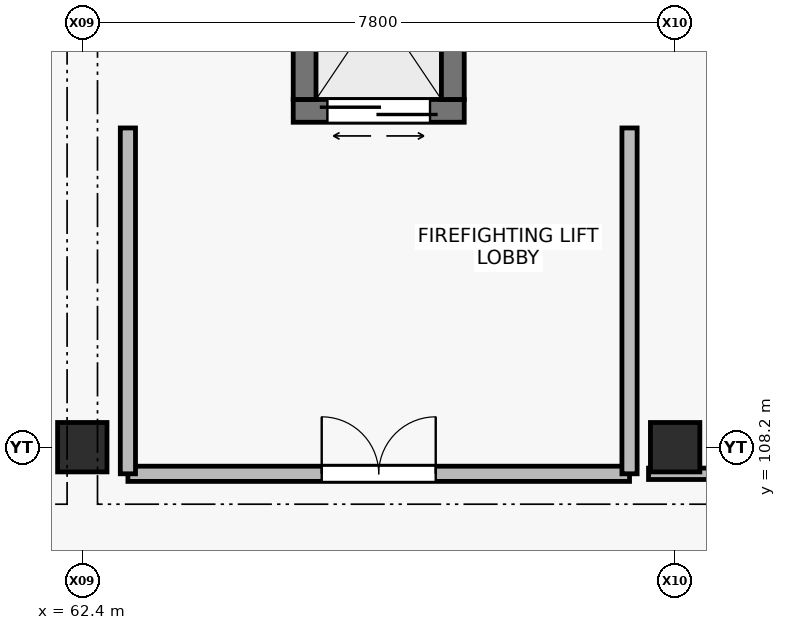
"""IFC4 building model, lengths in metres.
Left out: names, types, materials, properties, quantities, classifications, styles, units other than length and angle.
Written with IfcOpenShell. Run it as: python <this file> out.ifc"""

import sys

from ifc_helpers import new_model, si_unit, direction, frame, frame_2d, origin, origin_2d, place, context, subcontext, project, spatial, rectangle, extrude, element, fill, save


model = new_model("IFC4")
c1 = context("Model", 3, precision=1e-05, world=origin(), true_north=direction((0.0, 1.0)))
c2 = subcontext(c1, "Body", "Model", "MODEL_VIEW")
j1 = project(units=[si_unit("LENGTHUNIT", "METRE"), si_unit("PLANEANGLEUNIT", "RADIAN")], contexts=[c1])
p1 = place(None, origin())
s1 = spatial("IfcSite", under=j1, at=p1, CompositionType="ELEMENT")
p2 = place(p1, origin())
s2 = spatial("IfcBuilding", under=s1, at=p2, CompositionType="ELEMENT")
p3 = place(p2, origin())
s3 = spatial("IfcBuildingStorey", under=s2, at=p3, CompositionType="ELEMENT", Elevation=0.0)
for number, where, z_axis, x_axis in (
    (1, (62.4, 108.2, 0.0), (0.0, 0.0, 1.0), (1.0, 0.0, 0.0)),
    (2, (70.2, 108.2, 0.0), (0.0, 0.0, 1.0), (1.0, 0.0, 0.0)),
):
    element("IfcColumn", number, at=place(p3, frame(where, z_axis=z_axis, x_axis=x_axis)), inside=s3, PredefinedType="COLUMN", context=c2, shape_type="SweptSolid", body=[
        extrude(rectangle(XDim=0.65, YDim=0.65, at=origin_2d()), origin(), (0.0, 0.0, 1.0), 4.8),
    ])
p4 = place(p3, frame((65.175, 112.625, 0.0), z_axis=(0.0, 0.0, 1.0), x_axis=(1.0, 0.0, 0.0)))
e3 = element("IfcWall", 3, at=p4, inside=s3, PredefinedType="SHEAR", context=c2, shape_type="SweptSolid", body=[
    extrude(rectangle(XDim=2.25, YDim=0.3, at=frame_2d((1.125, 0.0))), origin(), (0.0, 0.0, 1.0), 4.54),
])
p5 = place(p4, frame((0.45, 0.0, 0.0)))
e4 = element("IfcOpeningElement", 4, at=p5, cuts=e3, PredefinedType="OPENING", context=c2, shape_type="SweptSolid", body=[
    extrude(rectangle(XDim=1.35, YDim=2.3, at=frame_2d((0.675, 1.15))), frame((0.0, 0.16, 0.0), z_axis=(0.0, -1.0, 0.0), x_axis=(1.0, 0.0, 0.0)), (0.0, 0.0, 1.0), 0.32),
])
for number, where, z_axis, x_axis in (
    (5, (65.325, 115.225, 0.0), (0.0, 0.0, 1.0), (0.0, -1.0, 0.0)),
    (6, (67.275, 112.775, 0.0), (0.0, 0.0, 1.0), (0.0, 1.0, 0.0)),
):
    element("IfcWall", number, at=place(p3, frame(where, z_axis=z_axis, x_axis=x_axis)), inside=s3, PredefinedType="SHEAR", context=c2, shape_type="SweptSolid", body=[
        extrude(rectangle(XDim=2.45, YDim=0.3, at=frame_2d((1.225, 0.0))), origin(), (0.0, 0.0, 1.0), 4.54),
    ])
p6 = place(p3, frame((63.0, 107.85, 0.0), z_axis=(0.0, 0.0, 1.0), x_axis=(1.0, 0.0, 0.0)))
e7 = element("IfcWall", 7, at=p6, inside=s3, PredefinedType="SOLIDWALL", context=c2, shape_type="SweptSolid", body=[
    extrude(rectangle(XDim=6.6, YDim=0.2, at=frame_2d((3.3, 0.0))), origin(), (0.0, 0.0, 1.0), 4.04),
])
p7 = place(p6, frame((2.55, 0.0, 0.0)))
e8 = element("IfcOpeningElement", 8, at=p7, cuts=e7, PredefinedType="OPENING", context=c2, shape_type="SweptSolid", body=[
    extrude(rectangle(XDim=1.5, YDim=2.2, at=frame_2d((0.75, 1.1))), frame((0.0, 0.11, 0.0), z_axis=(0.0, -1.0, 0.0), x_axis=(1.0, 0.0, 0.0)), (0.0, 0.0, 1.0), 0.22),
])
for number, where, z_axis, x_axis in (
    (9, (63.0, 112.4, 0.0), (0.0, 0.0, 1.0), (0.0, -1.0, 0.0)),
    (10, (69.6, 107.85, 0.0), (0.0, 0.0, 1.0), (0.0, 1.0, 0.0)),
):
    element("IfcWall", number, at=place(p3, frame(where, z_axis=z_axis, x_axis=x_axis)), inside=s3, PredefinedType="SOLIDWALL", context=c2, shape_type="SweptSolid", body=[
        extrude(rectangle(XDim=4.55, YDim=0.2, at=frame_2d((2.275, 0.0))), origin(), (0.0, 0.0, 1.0), 4.54),
    ])
p8 = place(p3, frame((69.85, 107.85, 0.0), z_axis=(0.0, 0.0, 1.0), x_axis=(1.0, 0.0, 0.0)))
e11 = element("IfcWall", 11, at=p8, inside=s3, PredefinedType="PARTITIONING", context=c2, shape_type="SweptSolid", body=[
    extrude(rectangle(XDim=3.12, YDim=0.15, at=frame_2d((1.56, 0.0))), origin(), (0.0, 0.0, 1.0), 4.04),
])
p9 = place(p8, frame((1.385, 0.0, 0.0)))
e12 = element("IfcOpeningElement", 12, at=p9, cuts=e11, PredefinedType="OPENING", context=c2, shape_type="SweptSolid", body=[
    extrude(rectangle(XDim=1.3, YDim=2.2, at=frame_2d((0.65, 1.1))), frame((0.0, 0.085, 0.0), z_axis=(0.0, -1.0, 0.0), x_axis=(1.0, 0.0, 0.0)), (0.0, 0.0, 1.0), 0.17),
])
p10 = place(p5, origin())
e13 = element("IfcDoor", 13, at=p10, inside=s3, OperationType="DOUBLE_DOOR_SLIDING", PredefinedType="DOOR", context=c2, shape_type="SweptSolid", body=[
    extrude(rectangle(XDim=1.35, YDim=2.3, at=frame_2d((0.675, 1.15))), frame((0.0, 0.025, 0.0), z_axis=(0.0, -1.0, 0.0), x_axis=(1.0, 0.0, 0.0)), (0.0, 0.0, 1.0), 0.05),
])
fill(e4, e13)
p11 = place(p7, origin())
e14 = element("IfcDoor", 14, at=p11, inside=s3, OperationType="DOUBLE_DOOR_SINGLE_SWING", PredefinedType="DOOR", context=c2, shape_type="SweptSolid", body=[
    extrude(rectangle(XDim=1.5, YDim=2.2, at=frame_2d((0.75, 1.1))), frame((0.0, 0.025, 0.0), z_axis=(0.0, -1.0, 0.0), x_axis=(1.0, 0.0, 0.0)), (0.0, 0.0, 1.0), 0.05),
])
fill(e8, e14)
save(model, sys.argv[1])
